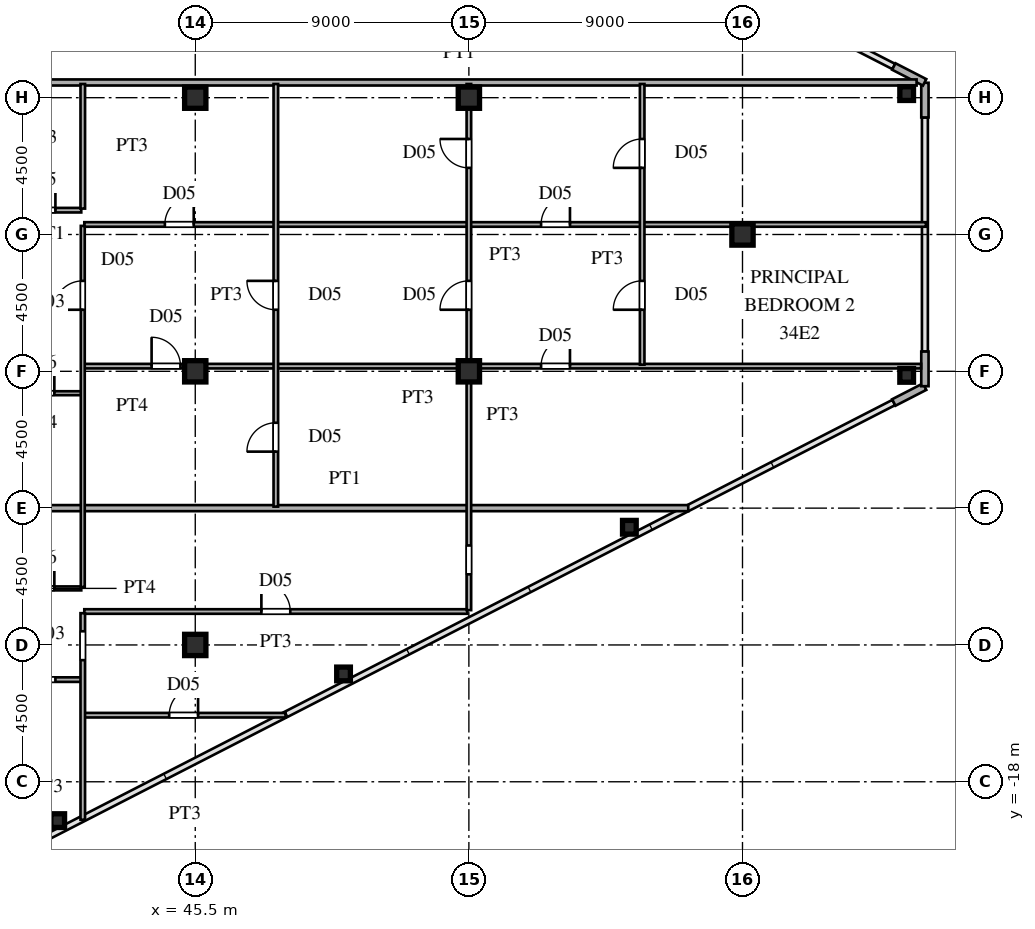
"""IFC4 building model, lengths in metres.
Left out: names, types, materials, properties, quantities, classifications, styles, units other than length and angle.
Written with IfcOpenShell. Run it as: python <this file> out.ifc"""

import sys

from ifc_helpers import new_model, si_unit, direction, frame, frame_2d, origin, origin_2d, place, context, subcontext, project, spatial, rectangle, hollow_rectangle, i_section, extrude, source, transform, mapped, element, fill, save


model = new_model("IFC4")
c1 = context("Model", 3, precision=1e-05, world=origin(), true_north=direction((0.0, 1.0)))
c2 = subcontext(c1, "Body", "Model", "MODEL_VIEW")
j1 = project(units=[si_unit("LENGTHUNIT", "METRE"), si_unit("PLANEANGLEUNIT", "RADIAN")], contexts=[c1])
p1 = place(None, origin())
s1 = spatial("IfcSite", under=j1, at=p1, CompositionType="ELEMENT")
p2 = place(p1, origin())
s2 = spatial("IfcBuilding", under=s1, at=p2, CompositionType="ELEMENT")
p3 = place(p2, frame((0.0, 0.0, 128.4)))
s3 = spatial("IfcBuildingStorey", under=s2, at=p3, CompositionType="ELEMENT", Elevation=128.4)
m1 = source(origin(), c2, "Body", "SweptSolid", [
    extrude(i_section(OverallWidth=0.7, OverallDepth=0.7, WebThickness=0.028, FlangeThickness=0.045, at=origin_2d()), origin(), (0.0, 0.0, 1.0), 3.6),
])
for number, where, z_axis, x_axis in (
    (1, (45.5, -13.5, 0.0), (0.0, 0.0, 1.0), (1.0, 0.0, 0.0)),
    (2, (45.5, -4.5, 0.0), (0.0, 0.0, 1.0), (1.0, 0.0, 0.0)),
    (3, (45.5, 4.5, 0.0), (0.0, 0.0, 1.0), (1.0, 0.0, 0.0)),
    (4, (54.5, -4.5, 0.0), (0.0, 0.0, 1.0), (1.0, 0.0, 0.0)),
    (5, (54.5, 4.5, 0.0), (0.0, 0.0, 1.0), (1.0, 0.0, 0.0)),
    (6, (63.5, 0.0, 0.0), (0.0, 0.0, 1.0), (1.0, 0.0, 0.0)),
):
    element("IfcColumn", number, at=place(p3, frame(where, z_axis=z_axis, x_axis=x_axis)), inside=s3, PredefinedType="COLUMN", context=c2, shape_type="MappedRepresentation", body=[
        mapped(m1, transform((0.0, 0.0, 0.0), scale=1.0)),
    ])
m2 = source(origin(), c2, "Body", "SweptSolid", [
    extrude(hollow_rectangle(XDim=0.45, YDim=0.45, WallThickness=0.018, at=origin_2d()), origin(), (0.0, 0.0, 1.0), 3.6),
])
for number, where, z_axis, x_axis in (
    (7, (68.9, -4.634, 0.0), (0.0, 0.0, 1.0), (1.0, 0.0, 0.0)),
    (8, (68.9, 4.634, 0.0), (0.0, 0.0, 1.0), (1.0, 0.0, 0.0)),
    (9, (40.976, -19.278, 0.0), (0.0, 0.0, 1.0), (1.0, 0.0, 0.0)),
    (10, (50.377, -14.453, 0.0), (0.0, 0.0, 1.0), (1.0, 0.0, 0.0)),
    (11, (59.779, -9.629, 0.0), (0.0, 0.0, 1.0), (1.0, 0.0, 0.0)),
):
    element("IfcColumn", number, at=place(p3, frame(where, z_axis=z_axis, x_axis=x_axis)), inside=s3, PredefinedType="COLUMN", context=c2, shape_type="MappedRepresentation", body=[
        mapped(m2, transform((0.0, 0.0, 0.0), scale=1.0)),
    ])
p4 = place(p3, frame((68.477, -5.525, 0.0), z_axis=(0.0, 0.0, 1.0), x_axis=(0.889797395748, 0.456355776255, 0.0)))
e12 = element("IfcWall", 12, at=p4, inside=s3, PredefinedType="SOLIDWALL", context=c2, shape_type="SweptSolid", body=[
    extrude(rectangle(XDim=1.14, YDim=0.24, at=frame_2d((0.57, 0.0))), origin(), (0.0, 0.0, 1.0), 3.38),
])
for number, where, z_axis, x_axis in (
    (13, (69.5, -4.99, 0.0), (0.0, 0.0, 1.0), (0.0, 1.0, 0.0)),
    (14, (69.5, 3.85, 0.0), (0.0, 0.0, 1.0), (0.0, 1.0, 0.0)),
):
    element("IfcWall", number, at=place(p3, frame(where, z_axis=z_axis, x_axis=x_axis)), inside=s3, PredefinedType="SOLIDWALL", context=c2, shape_type="SweptSolid", body=[
        extrude(rectangle(XDim=1.14, YDim=0.24, at=frame_2d((0.57, 0.0))), origin(), (0.0, 0.0, 1.0), 3.38),
    ])
p5 = place(p3, frame((69.491, 5.005, 0.0), z_axis=(0.0, 0.0, 1.0), x_axis=(-0.889797395748, 0.456355776255, 0.0)))
e15 = element("IfcWall", 15, at=p5, inside=s3, PredefinedType="SOLIDWALL", context=c2, shape_type="SweptSolid", body=[
    extrude(rectangle(XDim=1.14, YDim=0.24, at=frame_2d((0.57, 0.0))), origin(), (0.0, 0.0, 1.0), 3.38),
])
p6 = place(p3, frame((41.85, -15.81, 0.0), z_axis=(0.0, 0.0, 1.0), x_axis=(1.0, 0.0, 0.0)))
e16 = element("IfcWall", 16, at=p6, inside=s3, PredefinedType="PARTITIONING", context=c2, shape_type="SweptSolid", body=[
    extrude(rectangle(XDim=6.62, YDim=0.15, at=frame_2d((3.31, 0.0))), origin(), (0.0, 0.0, 1.0), 3.38),
])
p7 = place(p6, frame((2.792, 0.0, 0.0)))
e17 = element("IfcOpeningElement", 17, at=p7, cuts=e16, PredefinedType="OPENING", context=c2, shape_type="SweptSolid", body=[
    extrude(rectangle(XDim=0.95, YDim=2.15, at=frame_2d((0.475, 1.075))), frame((0.0, 0.085, 0.0), z_axis=(0.0, -1.0, 0.0), x_axis=(1.0, 0.0, 0.0)), (0.0, 0.0, 1.0), 0.17),
])
p8 = place(p3, frame((39.1, -14.64, 0.0), z_axis=(0.0, 0.0, 1.0), x_axis=(1.0, 0.0, 0.0)))
e18 = element("IfcWall", 18, at=p8, inside=s3, PredefinedType="PARTITIONING", context=c2, shape_type="SweptSolid", body=[
    extrude(rectangle(XDim=2.65, YDim=0.15, at=frame_2d((1.325, 0.0))), origin(), (0.0, 0.0, 1.0), 3.38),
])
p9 = place(p8, frame((0.85, 0.0, 0.0)))
e19 = element("IfcOpeningElement", 19, at=p9, cuts=e18, PredefinedType="OPENING", context=c2, shape_type="SweptSolid", body=[
    extrude(rectangle(XDim=0.95, YDim=2.15, at=frame_2d((0.475, 1.075))), frame((0.0, 0.085, 0.0), z_axis=(0.0, -1.0, 0.0), x_axis=(1.0, 0.0, 0.0)), (0.0, 0.0, 1.0), 0.17),
])
p10 = place(p3, frame((41.85, -12.4, 0.0), z_axis=(0.0, 0.0, 1.0), x_axis=(1.0, 0.0, 0.0)))
e20 = element("IfcWall", 20, at=p10, inside=s3, PredefinedType="PARTITIONING", context=c2, shape_type="SweptSolid", body=[
    extrude(rectangle(XDim=12.6, YDim=0.15, at=frame_2d((6.3, 0.0))), origin(), (0.0, 0.0, 1.0), 3.38),
])
p11 = place(p10, frame((5.825, 0.0, 0.0)))
e21 = element("IfcOpeningElement", 21, at=p11, cuts=e20, PredefinedType="OPENING", context=c2, shape_type="SweptSolid", body=[
    extrude(rectangle(XDim=0.95, YDim=2.15, at=frame_2d((0.475, 1.075))), frame((0.0, 0.085, 0.0), z_axis=(0.0, -1.0, 0.0), x_axis=(1.0, 0.0, 0.0)), (0.0, 0.0, 1.0), 0.17),
])
p12 = place(p3, frame((39.1, -11.64, 0.0), z_axis=(0.0, 0.0, 1.0), x_axis=(1.0, 0.0, 0.0)))
e22 = element("IfcWall", 22, at=p12, inside=s3, PredefinedType="PARTITIONING", context=c2, shape_type="SweptSolid", body=[
    extrude(rectangle(XDim=2.65, YDim=0.13, at=frame_2d((1.325, 0.0))), origin(), (0.0, 0.0, 1.0), 3.38),
])
p13 = place(p12, frame((0.885, 0.0, 0.0)))
e23 = element("IfcOpeningElement", 23, at=p13, cuts=e22, PredefinedType="OPENING", context=c2, shape_type="SweptSolid", body=[
    extrude(rectangle(XDim=0.88, YDim=2.1, at=frame_2d((0.44, 1.05))), frame((0.0, 0.075, 0.0), z_axis=(0.0, -1.0, 0.0), x_axis=(1.0, 0.0, 0.0)), (0.0, 0.0, 1.0), 0.15),
])
p14 = place(p3, frame((39.13, -9.0, 0.0), z_axis=(0.0, 0.0, 1.0), x_axis=(1.0, 0.0, 0.0)))
e24 = element("IfcWall", 24, at=p14, inside=s3, PredefinedType="PARTITIONING", context=c2, shape_type="SweptSolid", body=[
    extrude(rectangle(XDim=22.586, YDim=0.2, at=frame_2d((11.293, 0.0))), origin(), (0.0, 0.0, 1.0), 3.38),
])
p15 = place(p3, frame((39.1, -5.22, 0.0), z_axis=(0.0, 0.0, 1.0), x_axis=(1.0, 0.0, 0.0)))
e25 = element("IfcWall", 25, at=p15, inside=s3, PredefinedType="PARTITIONING", context=c2, shape_type="SweptSolid", body=[
    extrude(rectangle(XDim=2.65, YDim=0.13, at=frame_2d((1.325, 0.0))), origin(), (0.0, 0.0, 1.0), 3.38),
])
p16 = place(p15, frame((0.885, 0.0, 0.0)))
e26 = element("IfcOpeningElement", 26, at=p16, cuts=e25, PredefinedType="OPENING", context=c2, shape_type="SweptSolid", body=[
    extrude(rectangle(XDim=0.88, YDim=2.1, at=frame_2d((0.44, 1.05))), frame((0.0, 0.075, 0.0), z_axis=(0.0, -1.0, 0.0), x_axis=(1.0, 0.0, 0.0)), (0.0, 0.0, 1.0), 0.15),
])
p17 = place(p3, frame((41.85, -4.33, 0.0), z_axis=(0.0, 0.0, 1.0), x_axis=(1.0, 0.0, 0.0)))
e27 = element("IfcWall", 27, at=p17, inside=s3, PredefinedType="PARTITIONING", context=c2, shape_type="SweptSolid", body=[
    extrude(rectangle(XDim=27.525, YDim=0.15, at=frame_2d((13.762, 0.0))), origin(), (0.0, 0.0, 1.0), 3.38),
])
p18 = place(p17, frame((2.214, 0.0, 0.0)))
e28 = element("IfcOpeningElement", 28, at=p18, cuts=e27, PredefinedType="OPENING", context=c2, shape_type="SweptSolid", body=[
    extrude(rectangle(XDim=0.95, YDim=2.15, at=frame_2d((0.475, 1.075))), frame((0.0, 0.085, 0.0), z_axis=(0.0, -1.0, 0.0), x_axis=(1.0, 0.0, 0.0)), (0.0, 0.0, 1.0), 0.17),
])
p19 = place(p17, frame((15.025, 0.0, 0.0)))
e29 = element("IfcOpeningElement", 29, at=p19, cuts=e27, PredefinedType="OPENING", context=c2, shape_type="SweptSolid", body=[
    extrude(rectangle(XDim=0.95, YDim=2.15, at=frame_2d((0.475, 1.075))), frame((0.0, 0.085, 0.0), z_axis=(0.0, -1.0, 0.0), x_axis=(1.0, 0.0, 0.0)), (0.0, 0.0, 1.0), 0.17),
])
p20 = place(p3, frame((41.85, 0.33, 0.0), z_axis=(0.0, 0.0, 1.0), x_axis=(1.0, 0.0, 0.0)))
e30 = element("IfcWall", 30, at=p20, inside=s3, PredefinedType="PARTITIONING", context=c2, shape_type="SweptSolid", body=[
    extrude(rectangle(XDim=27.685, YDim=0.15, at=frame_2d((13.842, 0.0))), origin(), (0.0, 0.0, 1.0), 3.38),
])
p21 = place(p20, frame((2.65, 0.0, 0.0)))
e31 = element("IfcOpeningElement", 31, at=p21, cuts=e30, PredefinedType="OPENING", context=c2, shape_type="SweptSolid", body=[
    extrude(rectangle(XDim=0.95, YDim=2.15, at=frame_2d((0.475, 1.075))), frame((0.0, 0.085, 0.0), z_axis=(0.0, -1.0, 0.0), x_axis=(1.0, 0.0, 0.0)), (0.0, 0.0, 1.0), 0.17),
])
p22 = place(p20, frame((15.025, 0.0, 0.0)))
e32 = element("IfcOpeningElement", 32, at=p22, cuts=e30, PredefinedType="OPENING", context=c2, shape_type="SweptSolid", body=[
    extrude(rectangle(XDim=0.95, YDim=2.15, at=frame_2d((0.475, 1.075))), frame((0.0, 0.085, 0.0), z_axis=(0.0, -1.0, 0.0), x_axis=(1.0, 0.0, 0.0)), (0.0, 0.0, 1.0), 0.17),
])
p23 = place(p3, frame((39.1, 0.8, 0.0), z_axis=(0.0, 0.0, 1.0), x_axis=(1.0, 0.0, 0.0)))
e33 = element("IfcWall", 33, at=p23, inside=s3, PredefinedType="PARTITIONING", context=c2, shape_type="SweptSolid", body=[
    extrude(rectangle(XDim=2.65, YDim=0.15, at=frame_2d((1.325, 0.0))), origin(), (0.0, 0.0, 1.0), 3.38),
])
p24 = place(p23, frame((0.85, 0.0, 0.0)))
e34 = element("IfcOpeningElement", 34, at=p24, cuts=e33, PredefinedType="OPENING", context=c2, shape_type="SweptSolid", body=[
    extrude(rectangle(XDim=0.95, YDim=2.15, at=frame_2d((0.475, 1.075))), frame((0.0, 0.085, 0.0), z_axis=(0.0, -1.0, 0.0), x_axis=(1.0, 0.0, 0.0)), (0.0, 0.0, 1.0), 0.17),
])
p25 = place(p3, frame((39.13, 5.0, 0.0), z_axis=(0.0, 0.0, 1.0), x_axis=(1.0, 0.0, 0.0)))
e35 = element("IfcWall", 35, at=p25, inside=s3, PredefinedType="PARTITIONING", context=c2, shape_type="SweptSolid", body=[
    extrude(rectangle(XDim=30.096, YDim=0.2, at=frame_2d((15.048, 0.0))), origin(), (0.0, 0.0, 1.0), 3.38),
])
p26 = place(p3, frame((41.8, -19.25, 0.0), z_axis=(0.0, 0.0, 1.0), x_axis=(0.0, 1.0, 0.0)))
e36 = element("IfcWall", 36, at=p26, inside=s3, PredefinedType="PARTITIONING", context=c2, shape_type="SweptSolid", body=[
    extrude(rectangle(XDim=6.795, YDim=0.15, at=frame_2d((3.397, 0.0))), origin(), (0.0, 0.0, 1.0), 3.38),
])
p27 = place(p26, frame((5.25, 0.0, 0.0)))
e37 = element("IfcOpeningElement", 37, at=p27, cuts=e36, PredefinedType="OPENING", context=c2, shape_type="SweptSolid", body=[
    extrude(rectangle(XDim=0.95, YDim=2.15, at=frame_2d((0.475, 1.075))), frame((0.0, 0.085, 0.0), z_axis=(0.0, -1.0, 0.0), x_axis=(1.0, 0.0, 0.0)), (0.0, 0.0, 1.0), 0.17),
])
p28 = place(p3, frame((41.8, -11.595, 0.0), z_axis=(0.0, 0.0, 1.0), x_axis=(0.0, 1.0, 0.0)))
e38 = element("IfcWall", 38, at=p28, inside=s3, PredefinedType="PARTITIONING", context=c2, shape_type="SweptSolid", body=[
    extrude(rectangle(XDim=11.878, YDim=0.13, at=frame_2d((5.939, 0.0))), origin(), (0.0, 0.0, 1.0), 3.38),
])
p29 = place(p28, frame((9.12, 0.0, 0.0)))
e39 = element("IfcOpeningElement", 39, at=p29, cuts=e38, PredefinedType="OPENING", context=c2, shape_type="SweptSolid", body=[
    extrude(rectangle(XDim=0.95, YDim=2.15, at=frame_2d((0.475, 1.075))), frame((0.0, 0.075, 0.0), z_axis=(0.0, -1.0, 0.0), x_axis=(1.0, 0.0, 0.0)), (0.0, 0.0, 1.0), 0.15),
])
p30 = place(p3, frame((41.8, 0.852, 0.0), z_axis=(0.0, 0.0, 1.0), x_axis=(0.0, 1.0, 0.0)))
e40 = element("IfcWall", 40, at=p30, inside=s3, PredefinedType="PARTITIONING", context=c2, shape_type="SweptSolid", body=[
    extrude(rectangle(XDim=4.098, YDim=0.15, at=frame_2d((2.049, 0.0))), origin(), (0.0, 0.0, 1.0), 3.38),
])
p31 = place(p3, frame((48.15, -8.95, 0.0), z_axis=(0.0, 0.0, 1.0), x_axis=(0.0, 1.0, 0.0)))
e41 = element("IfcWall", 41, at=p31, inside=s3, PredefinedType="PARTITIONING", context=c2, shape_type="SweptSolid", body=[
    extrude(rectangle(XDim=13.9, YDim=0.15, at=frame_2d((6.95, 0.0))), origin(), (0.0, 0.0, 1.0), 3.38),
])
p32 = place(p31, frame((6.475, 0.0, 0.0)))
e42 = element("IfcOpeningElement", 42, at=p32, cuts=e41, PredefinedType="OPENING", context=c2, shape_type="SweptSolid", body=[
    extrude(rectangle(XDim=0.95, YDim=2.15, at=frame_2d((0.475, 1.075))), frame((0.0, 0.085, 0.0), z_axis=(0.0, -1.0, 0.0), x_axis=(1.0, 0.0, 0.0)), (0.0, 0.0, 1.0), 0.17),
])
p33 = place(p31, frame((1.808, 0.0, 0.0)))
e43 = element("IfcOpeningElement", 43, at=p33, cuts=e41, PredefinedType="OPENING", context=c2, shape_type="SweptSolid", body=[
    extrude(rectangle(XDim=0.95, YDim=2.15, at=frame_2d((0.475, 1.075))), frame((0.0, 0.085, 0.0), z_axis=(0.0, -1.0, 0.0), x_axis=(1.0, 0.0, 0.0)), (0.0, 0.0, 1.0), 0.17),
])
p34 = place(p3, frame((54.5, -12.355, 0.0), z_axis=(0.0, 0.0, 1.0), x_axis=(0.0, 1.0, 0.0)))
e44 = element("IfcWall", 44, at=p34, inside=s3, PredefinedType="PARTITIONING", context=c2, shape_type="SweptSolid", body=[
    extrude(rectangle(XDim=17.305, YDim=0.15, at=frame_2d((8.652, 0.0))), origin(), (0.0, 0.0, 1.0), 2.78),
])
p35 = place(p34, frame((1.177, 0.0, 0.0)))
e45 = element("IfcOpeningElement", 45, at=p35, cuts=e44, PredefinedType="OPENING", context=c2, shape_type="SweptSolid", body=[
    extrude(rectangle(XDim=0.95, YDim=2.15, at=frame_2d((0.475, 1.075))), frame((0.0, 0.085, 0.0), z_axis=(0.0, -1.0, 0.0), x_axis=(1.0, 0.0, 0.0)), (0.0, 0.0, 1.0), 0.17),
])
p36 = place(p34, frame((9.88, 0.0, 0.0)))
e46 = element("IfcOpeningElement", 46, at=p36, cuts=e44, PredefinedType="OPENING", context=c2, shape_type="SweptSolid", body=[
    extrude(rectangle(XDim=0.95, YDim=2.15, at=frame_2d((0.475, 1.075))), frame((0.0, 0.085, 0.0), z_axis=(0.0, -1.0, 0.0), x_axis=(1.0, 0.0, 0.0)), (0.0, 0.0, 1.0), 0.17),
])
p37 = place(p34, frame((14.547, 0.0, 0.0)))
e47 = element("IfcOpeningElement", 47, at=p37, cuts=e44, PredefinedType="OPENING", context=c2, shape_type="SweptSolid", body=[
    extrude(rectangle(XDim=0.95, YDim=2.15, at=frame_2d((0.475, 1.075))), frame((0.0, 0.085, 0.0), z_axis=(0.0, -1.0, 0.0), x_axis=(1.0, 0.0, 0.0)), (0.0, 0.0, 1.0), 0.17),
])
p38 = place(p3, frame((60.2, -4.283, 0.0), z_axis=(0.0, 0.0, 1.0), x_axis=(0.0, 1.0, 0.0)))
e48 = element("IfcWall", 48, at=p38, inside=s3, PredefinedType="PARTITIONING", context=c2, shape_type="SweptSolid", body=[
    extrude(rectangle(XDim=9.233, YDim=0.15, at=frame_2d((4.616, 0.0))), origin(), (0.0, 0.0, 1.0), 3.38),
])
p39 = place(p38, frame((1.808, 0.0, 0.0)))
e49 = element("IfcOpeningElement", 49, at=p39, cuts=e48, PredefinedType="OPENING", context=c2, shape_type="SweptSolid", body=[
    extrude(rectangle(XDim=0.95, YDim=2.15, at=frame_2d((0.475, 1.075))), frame((0.0, 0.085, 0.0), z_axis=(0.0, -1.0, 0.0), x_axis=(1.0, 0.0, 0.0)), (0.0, 0.0, 1.0), 0.17),
])
p40 = place(p38, frame((6.475, 0.0, 0.0)))
e50 = element("IfcOpeningElement", 50, at=p40, cuts=e48, PredefinedType="OPENING", context=c2, shape_type="SweptSolid", body=[
    extrude(rectangle(XDim=0.95, YDim=2.15, at=frame_2d((0.475, 1.075))), frame((0.0, 0.085, 0.0), z_axis=(0.0, -1.0, 0.0), x_axis=(1.0, 0.0, 0.0)), (0.0, 0.0, 1.0), 0.17),
])
m3 = source(origin(), c2, "Body", "SweptSolid", [
    extrude(rectangle(XDim=0.95, YDim=2.15, at=frame_2d((0.475, 1.075))), frame((0.0, 0.025, 0.0), z_axis=(0.0, -1.0, 0.0), x_axis=(1.0, 0.0, 0.0)), (0.0, 0.0, 1.0), 0.05),
])
p41 = place(p7, origin())
e51 = element("IfcDoor", 51, at=p41, inside=s3, OperationType="SINGLE_SWING_RIGHT", PredefinedType="DOOR", context=c2, shape_type="MappedRepresentation", body=[
    mapped(m3, transform((0.0, 0.0, 0.0), scale=1.0)),
])
fill(e17, e51)
p42 = place(p11, origin())
e52 = element("IfcDoor", 52, at=p42, inside=s3, OperationType="SINGLE_SWING_LEFT", PredefinedType="DOOR", context=c2, shape_type="MappedRepresentation", body=[
    mapped(m3, transform((0.0, 0.0, 0.0), scale=1.0)),
])
fill(e21, e52)
m4 = source(origin(), c2, "Body", "SweptSolid", [
    extrude(rectangle(XDim=0.88, YDim=2.1, at=frame_2d((0.44, 1.05))), frame((0.0, 0.025, 0.0), z_axis=(0.0, -1.0, 0.0), x_axis=(1.0, 0.0, 0.0)), (0.0, 0.0, 1.0), 0.05),
])
p43 = place(p13, origin())
e53 = element("IfcDoor", 53, at=p43, inside=s3, OperationType="SINGLE_SWING_RIGHT", PredefinedType="DOOR", context=c2, shape_type="MappedRepresentation", body=[
    mapped(m4, transform((0.0, 0.0, 0.0), scale=1.0)),
])
fill(e23, e53)
p44 = place(p16, origin())
e54 = element("IfcDoor", 54, at=p44, inside=s3, OperationType="SINGLE_SWING_RIGHT", PredefinedType="DOOR", context=c2, shape_type="MappedRepresentation", body=[
    mapped(m4, transform((0.0, 0.0, 0.0), scale=1.0)),
])
fill(e26, e54)
p45 = place(p18, origin())
e55 = element("IfcDoor", 55, at=p45, inside=s3, OperationType="SINGLE_SWING_LEFT", PredefinedType="DOOR", context=c2, shape_type="MappedRepresentation", body=[
    mapped(m3, transform((0.0, 0.0, 0.0), scale=1.0)),
])
fill(e28, e55)
p46 = place(p19, origin())
e56 = element("IfcDoor", 56, at=p46, inside=s3, OperationType="SINGLE_SWING_RIGHT", PredefinedType="DOOR", context=c2, shape_type="MappedRepresentation", body=[
    mapped(m3, transform((0.0, 0.0, 0.0), scale=1.0)),
])
fill(e29, e56)
p47 = place(p21, origin())
e57 = element("IfcDoor", 57, at=p47, inside=s3, OperationType="SINGLE_SWING_RIGHT", PredefinedType="DOOR", context=c2, shape_type="MappedRepresentation", body=[
    mapped(m3, transform((0.0, 0.0, 0.0), scale=1.0)),
])
fill(e31, e57)
p48 = place(p22, origin())
e58 = element("IfcDoor", 58, at=p48, inside=s3, OperationType="SINGLE_SWING_RIGHT", PredefinedType="DOOR", context=c2, shape_type="MappedRepresentation", body=[
    mapped(m3, transform((0.0, 0.0, 0.0), scale=1.0)),
])
fill(e32, e58)
p49 = place(p24, origin())
e59 = element("IfcDoor", 59, at=p49, inside=s3, OperationType="SINGLE_SWING_RIGHT", PredefinedType="DOOR", context=c2, shape_type="MappedRepresentation", body=[
    mapped(m3, transform((0.0, 0.0, 0.0), scale=1.0)),
])
fill(e34, e59)
p50 = place(p29, origin())
e60 = element("IfcDoor", 60, at=p50, inside=s3, OperationType="SINGLE_SWING_LEFT", PredefinedType="DOOR", context=c2, shape_type="MappedRepresentation", body=[
    mapped(m3, transform((0.0, 0.0, 0.0), scale=1.0)),
])
fill(e39, e60)
p51 = place(p32, origin())
e61 = element("IfcDoor", 61, at=p51, inside=s3, OperationType="SINGLE_SWING_RIGHT", PredefinedType="DOOR", context=c2, shape_type="MappedRepresentation", body=[
    mapped(m3, transform((0.0, 0.0, 0.0), scale=1.0)),
])
fill(e42, e61)
p52 = place(p33, origin())
e62 = element("IfcDoor", 62, at=p52, inside=s3, OperationType="SINGLE_SWING_LEFT", PredefinedType="DOOR", context=c2, shape_type="MappedRepresentation", body=[
    mapped(m3, transform((0.0, 0.0, 0.0), scale=1.0)),
])
fill(e43, e62)
p53 = place(p36, origin())
e63 = element("IfcDoor", 63, at=p53, inside=s3, OperationType="SINGLE_SWING_LEFT", PredefinedType="DOOR", context=c2, shape_type="MappedRepresentation", body=[
    mapped(m3, transform((0.0, 0.0, 0.0), scale=1.0)),
])
fill(e46, e63)
p54 = place(p37, origin())
e64 = element("IfcDoor", 64, at=p54, inside=s3, OperationType="SINGLE_SWING_RIGHT", PredefinedType="DOOR", context=c2, shape_type="MappedRepresentation", body=[
    mapped(m3, transform((0.0, 0.0, 0.0), scale=1.0)),
])
fill(e47, e64)
p55 = place(p39, origin())
e65 = element("IfcDoor", 65, at=p55, inside=s3, OperationType="SINGLE_SWING_LEFT", PredefinedType="DOOR", context=c2, shape_type="MappedRepresentation", body=[
    mapped(m3, transform((0.0, 0.0, 0.0), scale=1.0)),
])
fill(e49, e65)
p56 = place(p40, origin())
e66 = element("IfcDoor", 66, at=p56, inside=s3, OperationType="SINGLE_SWING_LEFT", PredefinedType="DOOR", context=c2, shape_type="MappedRepresentation", body=[
    mapped(m3, transform((0.0, 0.0, 0.0), scale=1.0)),
])
fill(e50, e66)
save(model, sys.argv[1])
